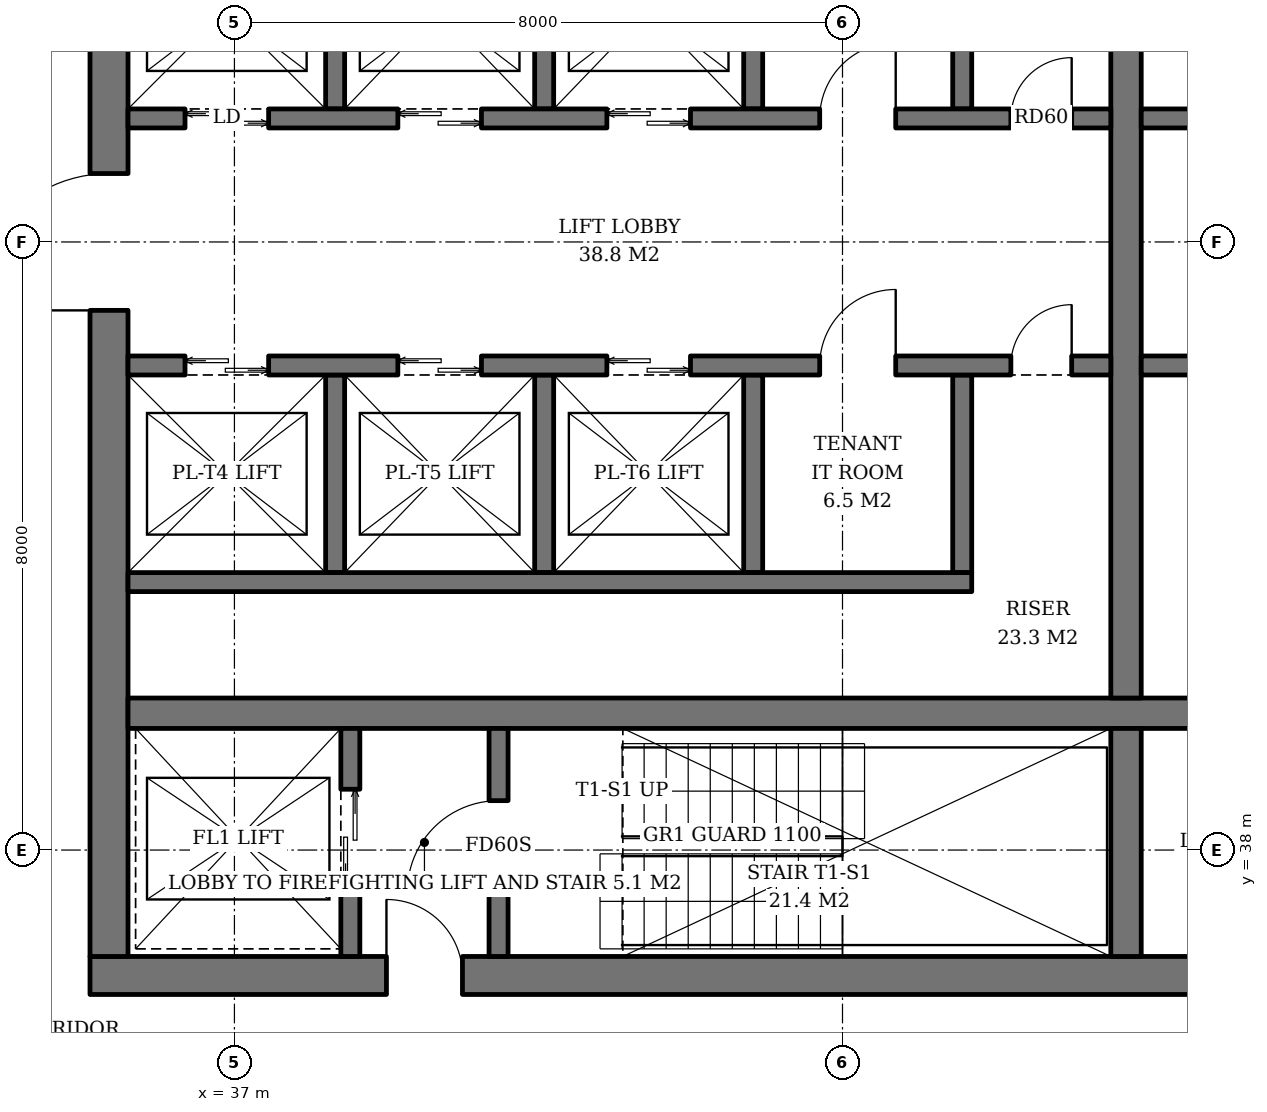
"""IFC4 building model, lengths in metres.
Left out: names, types, materials, properties, quantities, classifications, styles, units other than length and angle.
Written with IfcOpenShell. Run it as: python <this file> out.ifc"""

import sys

from ifc_helpers import new_model, si_unit, direction, frame, frame_2d, origin, place, context, subcontext, project, spatial, rectangle, extrude, element, fill, save


model = new_model("IFC4")
c1 = context("Model", 3, precision=1e-05, world=origin(), true_north=direction((0.0, 1.0)))
c2 = subcontext(c1, "Body", "Model", "MODEL_VIEW")
j1 = project(units=[si_unit("LENGTHUNIT", "METRE"), si_unit("PLANEANGLEUNIT", "RADIAN")], contexts=[c1])
p1 = place(None, origin())
s1 = spatial("IfcSite", under=j1, at=p1, CompositionType="ELEMENT")
p2 = place(p1, origin())
s2 = spatial("IfcBuilding", under=s1, at=p2, CompositionType="ELEMENT")
p3 = place(p2, frame((0.0, 0.0, 260.4)))
s3 = spatial("IfcBuildingStorey", under=s2, at=p3, CompositionType="ELEMENT", Elevation=260.4)
p4 = place(p3, frame((35.1, 36.35, 0.0), z_axis=(0.0, 0.0, 1.0), x_axis=(1.0, 0.0, 0.0)))
e1 = element("IfcWall", 1, at=p4, inside=s3, PredefinedType="SHEAR", context=c2, shape_type="SweptSolid", body=[
    extrude(rectangle(XDim=19.8, YDim=0.5, at=frame_2d((9.9, 0.0))), origin(), (0.0, 0.0, 1.0), 3.8),
])
p5 = place(p4, frame((3.9, 0.0, 0.0)))
e2 = element("IfcOpeningElement", 2, at=p5, cuts=e1, PredefinedType="OPENING", context=c2, shape_type="SweptSolid", body=[
    extrude(rectangle(XDim=1.0, YDim=2.1, at=frame_2d((0.5, 1.05))), frame((0.0, 0.26, 0.0), z_axis=(0.0, -1.0, 0.0), x_axis=(1.0, 0.0, 0.0)), (0.0, 0.0, 1.0), 0.52),
])
p6 = place(p4, frame((15.35, 0.0, 0.0)))
e3 = element("IfcOpeningElement", 3, at=p6, cuts=e1, PredefinedType="OPENING", context=c2, shape_type="SweptSolid", body=[
    extrude(rectangle(XDim=1.0, YDim=2.1, at=frame_2d((0.5, 1.05))), frame((0.0, 0.26, 0.0), z_axis=(0.0, -1.0, 0.0), x_axis=(1.0, 0.0, 0.0)), (0.0, 0.0, 1.0), 0.52),
])
p7 = place(p3, frame((35.35, 36.6, 0.0), z_axis=(0.0, 0.0, 1.0), x_axis=(0.0, 1.0, 0.0)))
e4 = element("IfcWall", 4, at=p7, inside=s3, PredefinedType="SHEAR", context=c2, shape_type="SweptSolid", body=[
    extrude(rectangle(XDim=18.8, YDim=0.5, at=frame_2d((9.4, 0.0))), origin(), (0.0, 0.0, 1.0), 3.8),
])
p8 = place(p7, frame((8.5, 0.0, 0.0)))
e5 = element("IfcOpeningElement", 5, at=p8, cuts=e4, PredefinedType="OPENING", context=c2, shape_type="SweptSolid", body=[
    extrude(rectangle(XDim=1.8, YDim=2.4, at=frame_2d((0.9, 1.2))), frame((0.0, 0.26, 0.0), z_axis=(0.0, -1.0, 0.0), x_axis=(1.0, 0.0, 0.0)), (0.0, 0.0, 1.0), 0.52),
])
p9 = place(p3, frame((35.6, 39.8, 0.0), z_axis=(0.0, 0.0, 1.0), x_axis=(1.0, 0.0, 0.0)))
e6 = element("IfcWall", 6, at=p9, inside=s3, PredefinedType="SHEAR", context=c2, shape_type="SweptSolid", body=[
    extrude(rectangle(XDim=18.8, YDim=0.4, at=frame_2d((9.4, 0.0))), origin(), (0.0, 0.0, 1.0), 3.8),
])
p10 = place(p3, frame((48.73, 36.6, 0.0), z_axis=(0.0, 0.0, 1.0), x_axis=(0.0, 1.0, 0.0)))
e7 = element("IfcWall", 7, at=p10, inside=s3, PredefinedType="SHEAR", context=c2, shape_type="SweptSolid", body=[
    extrude(rectangle(XDim=3.0, YDim=0.4, at=frame_2d((1.5, 0.0))), origin(), (0.0, 0.0, 1.0), 3.8),
])
p11 = place(p3, frame((48.73, 40.0, 0.0), z_axis=(0.0, 0.0, 1.0), x_axis=(0.0, 1.0, 0.0)))
e8 = element("IfcWall", 8, at=p11, inside=s3, PredefinedType="SHEAR", context=c2, shape_type="SweptSolid", body=[
    extrude(rectangle(XDim=12.0, YDim=0.4, at=frame_2d((6.0, 0.0))), origin(), (0.0, 0.0, 1.0), 3.8),
])
p12 = place(p3, frame((38.525, 36.6, 0.0), z_axis=(0.0, 0.0, 1.0), x_axis=(0.0, 1.0, 0.0)))
e9 = element("IfcWall", 9, at=p12, inside=s3, PredefinedType="SHEAR", context=c2, shape_type="SweptSolid", body=[
    extrude(rectangle(XDim=3.0, YDim=0.25, at=frame_2d((1.5, 0.0))), origin(), (0.0, 0.0, 1.0), 3.8),
])
p13 = place(p12, frame((0.9, 0.0, 0.0)))
e10 = element("IfcOpeningElement", 10, at=p13, cuts=e9, PredefinedType="OPENING", context=c2, shape_type="SweptSolid", body=[
    extrude(rectangle(XDim=1.3, YDim=2.2, at=frame_2d((0.65, 1.1))), frame((0.0, 0.135, 0.0), z_axis=(0.0, -1.0, 0.0), x_axis=(1.0, 0.0, 0.0)), (0.0, 0.0, 1.0), 0.27),
])
p14 = place(p3, frame((40.475, 36.6, 0.0), z_axis=(0.0, 0.0, 1.0), x_axis=(0.0, 1.0, 0.0)))
e11 = element("IfcWall", 11, at=p14, inside=s3, PredefinedType="SHEAR", context=c2, shape_type="SweptSolid", body=[
    extrude(rectangle(XDim=3.0, YDim=0.25, at=frame_2d((1.5, 0.0))), origin(), (0.0, 0.0, 1.0), 3.8),
])
p15 = place(p14, frame((0.85, 0.0, 0.0)))
e12 = element("IfcOpeningElement", 12, at=p15, cuts=e11, PredefinedType="OPENING", context=c2, shape_type="SweptSolid", body=[
    extrude(rectangle(XDim=1.2, YDim=2.1, at=frame_2d((0.6, 1.05))), frame((0.0, 0.135, 0.0), z_axis=(0.0, -1.0, 0.0), x_axis=(1.0, 0.0, 0.0)), (0.0, 0.0, 1.0), 0.27),
])
for number, where, z_axis, x_axis in (
    (13, (38.325, 47.75, 0.0), (0.0, 0.0, 1.0), (0.0, 1.0, 0.0)),
    (14, (41.075, 47.75, 0.0), (0.0, 0.0, 1.0), (0.0, 1.0, 0.0)),
    (15, (43.825, 47.75, 0.0), (0.0, 0.0, 1.0), (0.0, 1.0, 0.0)),
    (16, (46.575, 47.75, 0.0), (0.0, 0.0, 1.0), (0.0, 1.0, 0.0)),
):
    element("IfcWall", number, at=place(p3, frame(where, z_axis=z_axis, x_axis=x_axis)), inside=s3, PredefinedType="SHEAR", context=c2, shape_type="SweptSolid", body=[
        extrude(rectangle(XDim=2.6, YDim=0.25, at=frame_2d((1.3, 0.0))), origin(), (0.0, 0.0, 1.0), 3.8),
    ])
p16 = place(p3, frame((35.6, 47.625, 0.0), z_axis=(0.0, 0.0, 1.0), x_axis=(1.0, 0.0, 0.0)))
e17 = element("IfcWall", 17, at=p16, inside=s3, PredefinedType="SHEAR", context=c2, shape_type="SweptSolid", body=[
    extrude(rectangle(XDim=12.93, YDim=0.25, at=frame_2d((6.465, 0.0))), origin(), (0.0, 0.0, 1.0), 3.8),
])
p17 = place(p16, frame((0.75, 0.0, 0.0)))
e18 = element("IfcOpeningElement", 18, at=p17, cuts=e17, PredefinedType="OPENING", context=c2, shape_type="SweptSolid", body=[
    extrude(rectangle(XDim=1.1, YDim=2.2, at=frame_2d((0.55, 1.1))), frame((0.0, 0.135, 0.0), z_axis=(0.0, -1.0, 0.0), x_axis=(1.0, 0.0, 0.0)), (0.0, 0.0, 1.0), 0.27),
])
p18 = place(p16, frame((3.55, 0.0, 0.0)))
e19 = element("IfcOpeningElement", 19, at=p18, cuts=e17, PredefinedType="OPENING", context=c2, shape_type="SweptSolid", body=[
    extrude(rectangle(XDim=1.1, YDim=2.2, at=frame_2d((0.55, 1.1))), frame((0.0, 0.135, 0.0), z_axis=(0.0, -1.0, 0.0), x_axis=(1.0, 0.0, 0.0)), (0.0, 0.0, 1.0), 0.27),
])
p19 = place(p16, frame((6.3, 0.0, 0.0)))
e20 = element("IfcOpeningElement", 20, at=p19, cuts=e17, PredefinedType="OPENING", context=c2, shape_type="SweptSolid", body=[
    extrude(rectangle(XDim=1.1, YDim=2.2, at=frame_2d((0.55, 1.1))), frame((0.0, 0.135, 0.0), z_axis=(0.0, -1.0, 0.0), x_axis=(1.0, 0.0, 0.0)), (0.0, 0.0, 1.0), 0.27),
])
p20 = place(p16, frame((9.1, 0.0, 0.0)))
e21 = element("IfcOpeningElement", 21, at=p20, cuts=e17, PredefinedType="OPENING", context=c2, shape_type="SweptSolid", body=[
    extrude(rectangle(XDim=1.0, YDim=2.1, at=frame_2d((0.5, 1.05))), frame((0.0, 0.135, 0.0), z_axis=(0.0, -1.0, 0.0), x_axis=(1.0, 0.0, 0.0)), (0.0, 0.0, 1.0), 0.27),
])
p21 = place(p16, frame((11.615, 0.0, 0.0)))
e22 = element("IfcOpeningElement", 22, at=p21, cuts=e17, PredefinedType="OPENING", context=c2, shape_type="SweptSolid", body=[
    extrude(rectangle(XDim=0.8, YDim=2.0, at=frame_2d((0.4, 1.0))), frame((0.0, 0.135, 0.0), z_axis=(0.0, -1.0, 0.0), x_axis=(1.0, 0.0, 0.0)), (0.0, 0.0, 1.0), 0.27),
])
for number, where, z_axis, x_axis in (
    (23, (38.325, 44.25, 0.0), (0.0, 0.0, 1.0), (0.0, -1.0, 0.0)),
    (24, (41.075, 44.25, 0.0), (0.0, 0.0, 1.0), (0.0, -1.0, 0.0)),
    (25, (43.825, 44.25, 0.0), (0.0, 0.0, 1.0), (0.0, -1.0, 0.0)),
    (26, (46.575, 44.25, 0.0), (0.0, 0.0, 1.0), (0.0, -1.0, 0.0)),
):
    element("IfcWall", number, at=place(p3, frame(where, z_axis=z_axis, x_axis=x_axis)), inside=s3, PredefinedType="SHEAR", context=c2, shape_type="SweptSolid", body=[
        extrude(rectangle(XDim=2.6, YDim=0.25, at=frame_2d((1.3, 0.0))), origin(), (0.0, 0.0, 1.0), 3.8),
    ])
p22 = place(p3, frame((35.6, 41.525, 0.0), z_axis=(0.0, 0.0, 1.0), x_axis=(1.0, 0.0, 0.0)))
e27 = element("IfcWall", 27, at=p22, inside=s3, PredefinedType="SHEAR", context=c2, shape_type="SweptSolid", body=[
    extrude(rectangle(XDim=11.1, YDim=0.25, at=frame_2d((5.55, 0.0))), origin(), (0.0, 0.0, 1.0), 3.8),
])
p23 = place(p3, frame((35.6, 44.375, 0.0), z_axis=(0.0, 0.0, 1.0), x_axis=(1.0, 0.0, 0.0)))
e28 = element("IfcWall", 28, at=p23, inside=s3, PredefinedType="SHEAR", context=c2, shape_type="SweptSolid", body=[
    extrude(rectangle(XDim=12.93, YDim=0.25, at=frame_2d((6.465, 0.0))), origin(), (0.0, 0.0, 1.0), 3.8),
])
p24 = place(p23, frame((0.75, 0.0, 0.0)))
e29 = element("IfcOpeningElement", 29, at=p24, cuts=e28, PredefinedType="OPENING", context=c2, shape_type="SweptSolid", body=[
    extrude(rectangle(XDim=1.1, YDim=2.2, at=frame_2d((0.55, 1.1))), frame((0.0, 0.135, 0.0), z_axis=(0.0, -1.0, 0.0), x_axis=(1.0, 0.0, 0.0)), (0.0, 0.0, 1.0), 0.27),
])
p25 = place(p23, frame((3.55, 0.0, 0.0)))
e30 = element("IfcOpeningElement", 30, at=p25, cuts=e28, PredefinedType="OPENING", context=c2, shape_type="SweptSolid", body=[
    extrude(rectangle(XDim=1.1, YDim=2.2, at=frame_2d((0.55, 1.1))), frame((0.0, 0.135, 0.0), z_axis=(0.0, -1.0, 0.0), x_axis=(1.0, 0.0, 0.0)), (0.0, 0.0, 1.0), 0.27),
])
p26 = place(p23, frame((6.3, 0.0, 0.0)))
e31 = element("IfcOpeningElement", 31, at=p26, cuts=e28, PredefinedType="OPENING", context=c2, shape_type="SweptSolid", body=[
    extrude(rectangle(XDim=1.1, YDim=2.2, at=frame_2d((0.55, 1.1))), frame((0.0, 0.135, 0.0), z_axis=(0.0, -1.0, 0.0), x_axis=(1.0, 0.0, 0.0)), (0.0, 0.0, 1.0), 0.27),
])
p27 = place(p23, frame((9.1, 0.0, 0.0)))
e32 = element("IfcOpeningElement", 32, at=p27, cuts=e28, PredefinedType="OPENING", context=c2, shape_type="SweptSolid", body=[
    extrude(rectangle(XDim=1.0, YDim=2.1, at=frame_2d((0.5, 1.05))), frame((0.0, 0.135, 0.0), z_axis=(0.0, -1.0, 0.0), x_axis=(1.0, 0.0, 0.0)), (0.0, 0.0, 1.0), 0.27),
])
p28 = place(p23, frame((11.615, 0.0, 0.0)))
e33 = element("IfcOpeningElement", 33, at=p28, cuts=e28, PredefinedType="OPENING", context=c2, shape_type="SweptSolid", body=[
    extrude(rectangle(XDim=0.8, YDim=2.0, at=frame_2d((0.4, 1.0))), frame((0.0, 0.135, 0.0), z_axis=(0.0, -1.0, 0.0), x_axis=(1.0, 0.0, 0.0)), (0.0, 0.0, 1.0), 0.27),
])
p29 = place(p3, frame((48.93, 47.625, 0.0), z_axis=(0.0, 0.0, 1.0), x_axis=(1.0, 0.0, 0.0)))
e34 = element("IfcWall", 34, at=p29, inside=s3, PredefinedType="SHEAR", context=c2, shape_type="SweptSolid", body=[
    extrude(rectangle(XDim=5.47, YDim=0.25, at=frame_2d((2.735, 0.0))), origin(), (0.0, 0.0, 1.0), 3.8),
])
p30 = place(p29, frame((0.78, 0.0, 0.0)))
e35 = element("IfcOpeningElement", 35, at=p30, cuts=e34, PredefinedType="OPENING", context=c2, shape_type="SweptSolid", body=[
    extrude(rectangle(XDim=1.0, YDim=2.1, at=frame_2d((0.5, 1.05))), frame((0.0, 0.135, 0.0), z_axis=(0.0, -1.0, 0.0), x_axis=(1.0, 0.0, 0.0)), (0.0, 0.0, 1.0), 0.27),
])
p31 = place(p29, frame((3.64, 0.0, 0.0)))
e36 = element("IfcOpeningElement", 36, at=p31, cuts=e34, PredefinedType="OPENING", context=c2, shape_type="SweptSolid", body=[
    extrude(rectangle(XDim=1.0, YDim=2.1, at=frame_2d((0.5, 1.05))), frame((0.0, 0.135, 0.0), z_axis=(0.0, -1.0, 0.0), x_axis=(1.0, 0.0, 0.0)), (0.0, 0.0, 1.0), 0.27),
])
p32 = place(p3, frame((48.93, 44.375, 0.0), z_axis=(0.0, 0.0, 1.0), x_axis=(1.0, 0.0, 0.0)))
e37 = element("IfcWall", 37, at=p32, inside=s3, PredefinedType="SHEAR", context=c2, shape_type="SweptSolid", body=[
    extrude(rectangle(XDim=5.47, YDim=0.25, at=frame_2d((2.735, 0.0))), origin(), (0.0, 0.0, 1.0), 3.8),
])
p33 = place(p32, frame((0.78, 0.0, 0.0)))
e38 = element("IfcOpeningElement", 38, at=p33, cuts=e37, PredefinedType="OPENING", context=c2, shape_type="SweptSolid", body=[
    extrude(rectangle(XDim=1.0, YDim=2.1, at=frame_2d((0.5, 1.05))), frame((0.0, 0.135, 0.0), z_axis=(0.0, -1.0, 0.0), x_axis=(1.0, 0.0, 0.0)), (0.0, 0.0, 1.0), 0.27),
])
p34 = place(p32, frame((3.64, 0.0, 0.0)))
e39 = element("IfcOpeningElement", 39, at=p34, cuts=e37, PredefinedType="OPENING", context=c2, shape_type="SweptSolid", body=[
    extrude(rectangle(XDim=1.0, YDim=2.1, at=frame_2d((0.5, 1.05))), frame((0.0, 0.135, 0.0), z_axis=(0.0, -1.0, 0.0), x_axis=(1.0, 0.0, 0.0)), (0.0, 0.0, 1.0), 0.27),
])
p35 = place(p13, origin())
e40 = element("IfcDoor", 40, at=p35, inside=s3, OperationType="DOUBLE_DOOR_SLIDING", PredefinedType="DOOR", context=c2, shape_type="SweptSolid", body=[
    extrude(rectangle(XDim=1.3, YDim=2.2, at=frame_2d((0.65, 1.1))), frame((0.0, 0.025, 0.0), z_axis=(0.0, -1.0, 0.0), x_axis=(1.0, 0.0, 0.0)), (0.0, 0.0, 1.0), 0.05),
])
fill(e10, e40)
p36 = place(p15, origin())
e41 = element("IfcDoor", 41, at=p36, inside=s3, OperationType="SINGLE_SWING_LEFT", PredefinedType="DOOR", context=c2, shape_type="SweptSolid", body=[
    extrude(rectangle(XDim=1.2, YDim=2.1, at=frame_2d((0.6, 1.05))), frame((0.0, 0.025, 0.0), z_axis=(0.0, -1.0, 0.0), x_axis=(1.0, 0.0, 0.0)), (0.0, 0.0, 1.0), 0.05),
])
fill(e12, e41)
p37 = place(p17, origin())
e42 = element("IfcDoor", 42, at=p37, inside=s3, OperationType="DOUBLE_DOOR_SLIDING", PredefinedType="DOOR", context=c2, shape_type="SweptSolid", body=[
    extrude(rectangle(XDim=1.1, YDim=2.2, at=frame_2d((0.55, 1.1))), frame((0.0, 0.025, 0.0), z_axis=(0.0, -1.0, 0.0), x_axis=(1.0, 0.0, 0.0)), (0.0, 0.0, 1.0), 0.05),
])
fill(e18, e42)
p38 = place(p18, origin())
e43 = element("IfcDoor", 43, at=p38, inside=s3, OperationType="DOUBLE_DOOR_SLIDING", PredefinedType="DOOR", context=c2, shape_type="SweptSolid", body=[
    extrude(rectangle(XDim=1.1, YDim=2.2, at=frame_2d((0.55, 1.1))), frame((0.0, 0.025, 0.0), z_axis=(0.0, -1.0, 0.0), x_axis=(1.0, 0.0, 0.0)), (0.0, 0.0, 1.0), 0.05),
])
fill(e19, e43)
p39 = place(p19, origin())
e44 = element("IfcDoor", 44, at=p39, inside=s3, OperationType="DOUBLE_DOOR_SLIDING", PredefinedType="DOOR", context=c2, shape_type="SweptSolid", body=[
    extrude(rectangle(XDim=1.1, YDim=2.2, at=frame_2d((0.55, 1.1))), frame((0.0, 0.025, 0.0), z_axis=(0.0, -1.0, 0.0), x_axis=(1.0, 0.0, 0.0)), (0.0, 0.0, 1.0), 0.05),
])
fill(e20, e44)
p40 = place(p20, origin())
e45 = element("IfcDoor", 45, at=p40, inside=s3, OperationType="SINGLE_SWING_RIGHT", PredefinedType="DOOR", context=c2, shape_type="SweptSolid", body=[
    extrude(rectangle(XDim=1.0, YDim=2.1, at=frame_2d((0.5, 1.05))), frame((0.0, 0.025, 0.0), z_axis=(0.0, -1.0, 0.0), x_axis=(1.0, 0.0, 0.0)), (0.0, 0.0, 1.0), 0.05),
])
fill(e21, e45)
p41 = place(p21, origin())
e46 = element("IfcDoor", 46, at=p41, inside=s3, OperationType="SINGLE_SWING_RIGHT", PredefinedType="DOOR", context=c2, shape_type="SweptSolid", body=[
    extrude(rectangle(XDim=0.8, YDim=2.0, at=frame_2d((0.4, 1.0))), frame((0.0, 0.025, 0.0), z_axis=(0.0, -1.0, 0.0), x_axis=(1.0, 0.0, 0.0)), (0.0, 0.0, 1.0), 0.05),
])
fill(e22, e46)
p42 = place(p24, origin())
e47 = element("IfcDoor", 47, at=p42, inside=s3, OperationType="DOUBLE_DOOR_SLIDING", PredefinedType="DOOR", context=c2, shape_type="SweptSolid", body=[
    extrude(rectangle(XDim=1.1, YDim=2.2, at=frame_2d((0.55, 1.1))), frame((0.0, 0.025, 0.0), z_axis=(0.0, -1.0, 0.0), x_axis=(1.0, 0.0, 0.0)), (0.0, 0.0, 1.0), 0.05),
])
fill(e29, e47)
p43 = place(p25, origin())
e48 = element("IfcDoor", 48, at=p43, inside=s3, OperationType="DOUBLE_DOOR_SLIDING", PredefinedType="DOOR", context=c2, shape_type="SweptSolid", body=[
    extrude(rectangle(XDim=1.1, YDim=2.2, at=frame_2d((0.55, 1.1))), frame((0.0, 0.025, 0.0), z_axis=(0.0, -1.0, 0.0), x_axis=(1.0, 0.0, 0.0)), (0.0, 0.0, 1.0), 0.05),
])
fill(e30, e48)
p44 = place(p26, origin())
e49 = element("IfcDoor", 49, at=p44, inside=s3, OperationType="DOUBLE_DOOR_SLIDING", PredefinedType="DOOR", context=c2, shape_type="SweptSolid", body=[
    extrude(rectangle(XDim=1.1, YDim=2.2, at=frame_2d((0.55, 1.1))), frame((0.0, 0.025, 0.0), z_axis=(0.0, -1.0, 0.0), x_axis=(1.0, 0.0, 0.0)), (0.0, 0.0, 1.0), 0.05),
])
fill(e31, e49)
p45 = place(p27, origin())
e50 = element("IfcDoor", 50, at=p45, inside=s3, OperationType="SINGLE_SWING_RIGHT", PredefinedType="DOOR", context=c2, shape_type="SweptSolid", body=[
    extrude(rectangle(XDim=1.0, YDim=2.1, at=frame_2d((0.5, 1.05))), frame((0.0, 0.025, 0.0), z_axis=(0.0, -1.0, 0.0), x_axis=(1.0, 0.0, 0.0)), (0.0, 0.0, 1.0), 0.05),
])
fill(e32, e50)
p46 = place(p28, origin())
e51 = element("IfcDoor", 51, at=p46, inside=s3, OperationType="SINGLE_SWING_RIGHT", PredefinedType="DOOR", context=c2, shape_type="SweptSolid", body=[
    extrude(rectangle(XDim=0.8, YDim=2.0, at=frame_2d((0.4, 1.0))), frame((0.0, 0.025, 0.0), z_axis=(0.0, -1.0, 0.0), x_axis=(1.0, 0.0, 0.0)), (0.0, 0.0, 1.0), 0.05),
])
fill(e33, e51)
p47 = place(p5, origin())
e52 = element("IfcDoor", 52, at=p47, inside=s3, OperationType="SINGLE_SWING_LEFT", PredefinedType="DOOR", context=c2, shape_type="SweptSolid", body=[
    extrude(rectangle(XDim=1.0, YDim=2.1, at=frame_2d((0.5, 1.05))), frame((0.0, 0.025, 0.0), z_axis=(0.0, -1.0, 0.0), x_axis=(1.0, 0.0, 0.0)), (0.0, 0.0, 1.0), 0.05),
])
fill(e2, e52)
p48 = place(p8, origin())
e53 = element("IfcDoor", 53, at=p48, inside=s3, OperationType="DOUBLE_DOOR_SINGLE_SWING", PredefinedType="DOOR", context=c2, shape_type="SweptSolid", body=[
    extrude(rectangle(XDim=1.8, YDim=2.4, at=frame_2d((0.9, 1.2))), frame((0.0, 0.025, 0.0), z_axis=(0.0, -1.0, 0.0), x_axis=(1.0, 0.0, 0.0)), (0.0, 0.0, 1.0), 0.05),
])
fill(e5, e53)
save(model, sys.argv[1])
